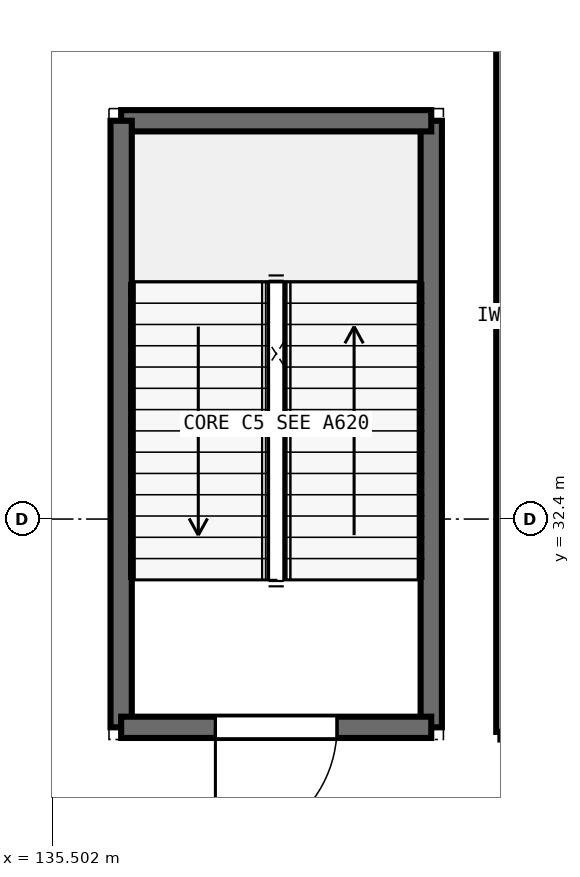
"""IFC4 building model, lengths in metres.
Left out: names, types, materials, properties, quantities, classifications, styles, units other than length and angle.
Written with IfcOpenShell. Run it as: python <this file> out.ifc"""

import sys

from ifc_helpers import new_model, si_unit, direction, frame, frame_2d, origin, place, context, subcontext, project, spatial, rectangle, extrude, element, fill, save


model = new_model("IFC4")
c1 = context("Model", 3, precision=1e-05, world=origin(), true_north=direction((0.0, 1.0)))
c2 = subcontext(c1, "Body", "Model", "MODEL_VIEW")
j1 = project(units=[si_unit("LENGTHUNIT", "METRE"), si_unit("PLANEANGLEUNIT", "RADIAN")], contexts=[c1])
p1 = place(None, origin())
s1 = spatial("IfcSite", under=j1, at=p1, CompositionType="ELEMENT")
p2 = place(p1, origin())
s2 = spatial("IfcBuilding", under=s1, at=p2, CompositionType="ELEMENT")
p3 = place(p2, frame((0.0, 0.0, 10.8)))
s3 = spatial("IfcBuildingStorey", under=s2, at=p3, CompositionType="ELEMENT", Elevation=10.8)
p4 = place(p3, frame((140.49, 29.66, 0.0), z_axis=(0.0, 0.0, 1.0), x_axis=(0.0, 1.0, 0.0)))
e1 = element("IfcWall", 1, at=p4, inside=s3, PredefinedType="SHEAR", context=c2, shape_type="SweptSolid", body=[
    extrude(rectangle(XDim=7.98, YDim=0.28, at=frame_2d((3.99, 0.0))), origin(), (0.0, 0.0, 1.0), 5.4),
])
p5 = place(p3, frame((140.49, 37.64, 0.0), z_axis=(0.0, 0.0, 1.0), x_axis=(-1.0, 0.0, 0.0)))
e2 = element("IfcWall", 2, at=p5, inside=s3, PredefinedType="SHEAR", context=c2, shape_type="SweptSolid", body=[
    extrude(rectangle(XDim=4.08, YDim=0.28, at=frame_2d((2.04, 0.0))), origin(), (0.0, 0.0, 1.0), 5.4),
])
p6 = place(p3, frame((136.41, 37.64, 0.0), z_axis=(0.0, 0.0, 1.0), x_axis=(0.0, -1.0, 0.0)))
e3 = element("IfcWall", 3, at=p6, inside=s3, PredefinedType="SHEAR", context=c2, shape_type="SweptSolid", body=[
    extrude(rectangle(XDim=7.98, YDim=0.28, at=frame_2d((3.99, 0.0))), origin(), (0.0, 0.0, 1.0), 5.4),
])
p7 = place(p3, frame((136.41, 29.66, 0.0), z_axis=(0.0, 0.0, 1.0), x_axis=(1.0, 0.0, 0.0)))
e4 = element("IfcWall", 4, at=p7, inside=s3, PredefinedType="SHEAR", context=c2, shape_type="SweptSolid", body=[
    extrude(rectangle(XDim=4.08, YDim=0.28, at=frame_2d((2.04, 0.0))), origin(), (0.0, 0.0, 1.0), 5.4),
])
p8 = place(p7, frame((1.24, 0.0, 0.0)))
e5 = element("IfcOpeningElement", 5, at=p8, cuts=e4, PredefinedType="OPENING", context=c2, shape_type="SweptSolid", body=[
    extrude(rectangle(XDim=1.6, YDim=2.25, at=frame_2d((0.8, 1.125))), frame((0.0, 0.15, 0.0), z_axis=(0.0, -1.0, 0.0), x_axis=(1.0, 0.0, 0.0)), (0.0, 0.0, 1.0), 0.3),
])
p9 = place(p3, frame((141.4, 29.6, 0.0), z_axis=(0.0, 0.0, 1.0), x_axis=(1.0, 0.0, 0.0)))
e6 = element("IfcWall", 6, at=p9, inside=s3, PredefinedType="PARTITIONING", context=c2, shape_type="SweptSolid", body=[
    extrude(rectangle(XDim=9.8, YDim=0.2, at=frame_2d((4.9, 0.0))), origin(), (0.0, 0.0, 1.0), 5.07),
])
p10 = place(p9, frame((4.25, 0.0, 0.0)))
e7 = element("IfcOpeningElement", 7, at=p10, cuts=e6, PredefinedType="OPENING", context=c2, shape_type="SweptSolid", body=[
    extrude(rectangle(XDim=1.3, YDim=2.2, at=frame_2d((0.65, 1.1))), frame((0.0, 0.11, 0.0), z_axis=(0.0, -1.0, 0.0), x_axis=(1.0, 0.0, 0.0)), (0.0, 0.0, 1.0), 0.22),
])
p11 = place(p3, frame((141.4, 29.6, 0.0), z_axis=(0.0, 0.0, 1.0), x_axis=(0.0, 1.0, 0.0)))
e8 = element("IfcWall", 8, at=p11, inside=s3, PredefinedType="PARTITIONING", context=c2, shape_type="SweptSolid", body=[
    extrude(rectangle(XDim=10.94, YDim=0.11, at=frame_2d((5.47, 0.0))), origin(), (0.0, 0.0, 1.0), 5.07),
])
p12 = place(p8, frame((1.6, 0.0, 0.0), z_axis=(0.0, 0.0, 1.0), x_axis=(-1.0, 0.0, 0.0)))
e9 = element("IfcDoor", 9, at=p12, inside=s3, OperationType="SINGLE_SWING_RIGHT", PredefinedType="DOOR", context=c2, shape_type="SweptSolid", body=[
    extrude(rectangle(XDim=1.6, YDim=2.25, at=frame_2d((0.8, 1.125))), frame((0.0, 0.025, 0.0), z_axis=(0.0, -1.0, 0.0), x_axis=(1.0, 0.0, 0.0)), (0.0, 0.0, 1.0), 0.05),
])
fill(e5, e9)
save(model, sys.argv[1])
